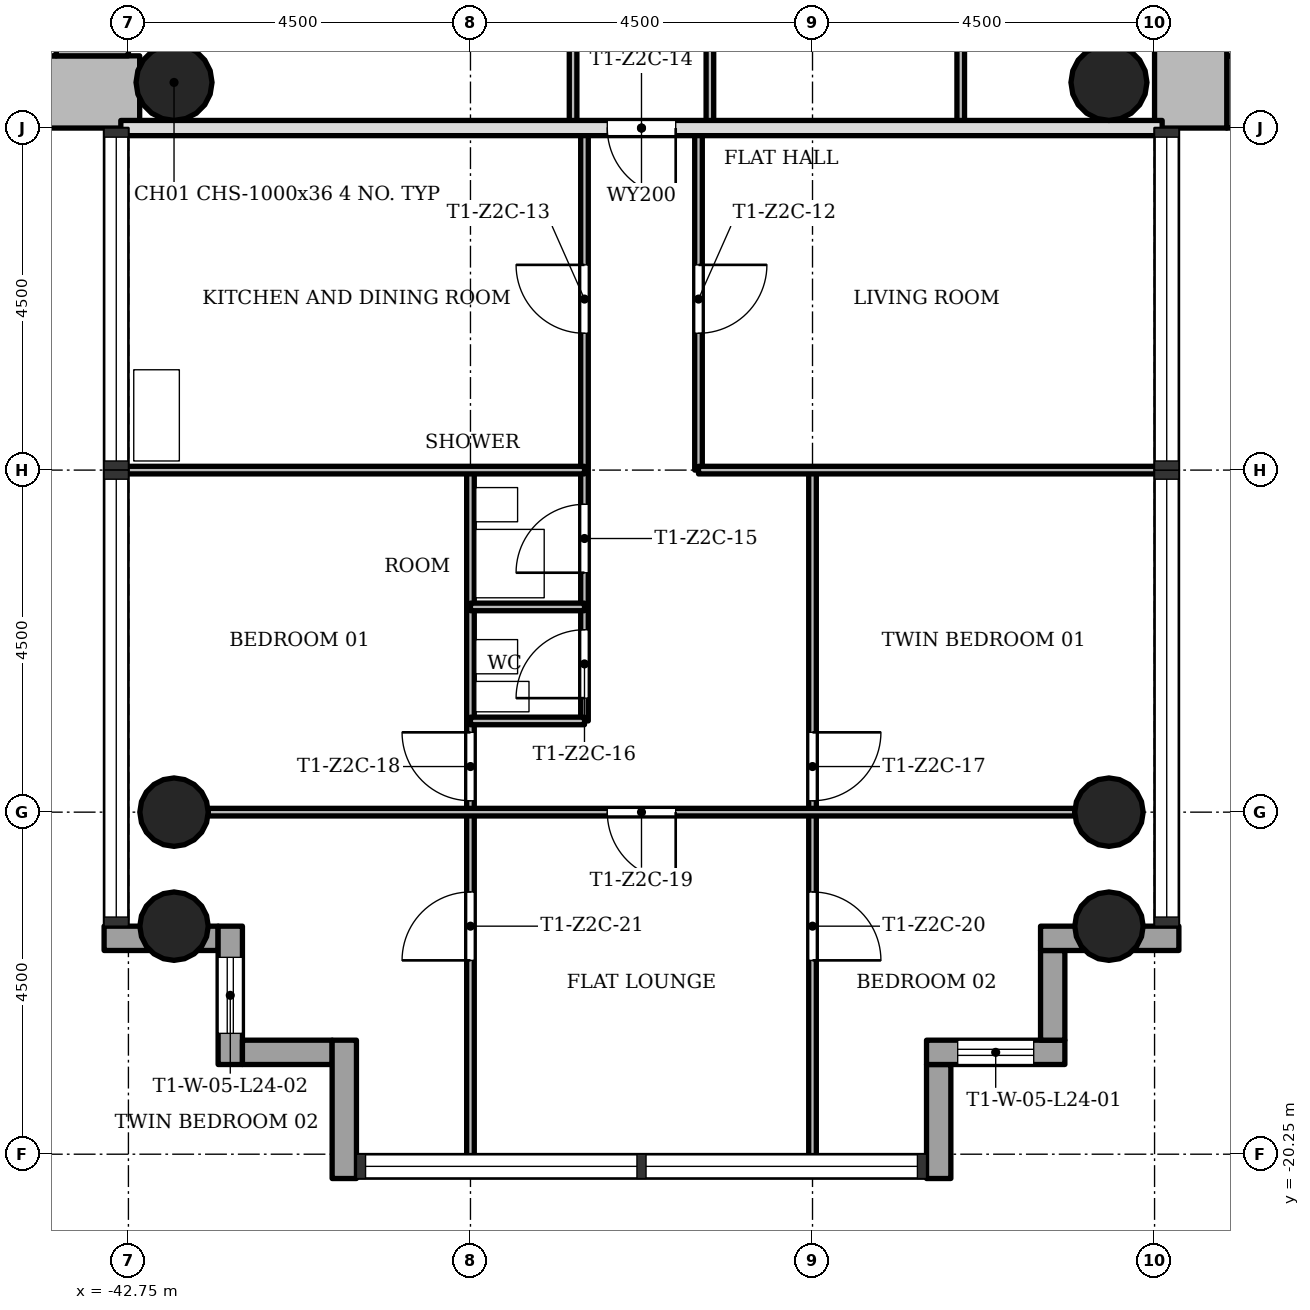
"""IFC4 building model, lengths in metres.
Left out: names, types, materials, properties, quantities, classifications, styles, units other than length and angle.
Written with IfcOpenShell. Run it as: python <this file> out.ifc"""

import sys

from ifc_helpers import new_model, si_unit, direction, frame, frame_2d, origin, origin_2d, place, context, subcontext, project, spatial, rectangle, hollow_circle, extrude, element, fill, save


model = new_model("IFC4")
c1 = context("Model", 3, precision=1e-05, world=origin(), true_north=direction((0.0, 1.0)))
c2 = subcontext(c1, "Body", "Model", "MODEL_VIEW")
j1 = project(units=[si_unit("LENGTHUNIT", "METRE"), si_unit("PLANEANGLEUNIT", "RADIAN")], contexts=[c1])
p1 = place(None, origin())
s1 = spatial("IfcSite", under=j1, at=p1, CompositionType="ELEMENT")
p2 = place(p1, origin())
s2 = spatial("IfcBuilding", under=s1, at=p2, CompositionType="ELEMENT")
p3 = place(p2, frame((0.0, 0.0, 90.2)))
s3 = spatial("IfcBuildingStorey", under=s2, at=p3, CompositionType="ELEMENT", Elevation=90.2)
p4 = place(p3, frame((-28.3, -6.275, 0.0), z_axis=(0.0, 0.0, 1.0), x_axis=(1.0, 0.0, 0.0)))
e1 = element("IfcWall", 1, at=p4, inside=s3, PredefinedType="SHEAR", context=c2, shape_type="SweptSolid", body=[
    extrude(rectangle(XDim=8.05, YDim=0.95, at=frame_2d((4.025, 0.0))), origin(), (0.0, 0.0, 1.0), 3.4),
])
p5 = place(p3, frame((-28.775, 5.8, 0.0), z_axis=(0.0, 0.0, 1.0), x_axis=(0.0, -1.0, 0.0)))
e2 = element("IfcWall", 2, at=p5, inside=s3, PredefinedType="SHEAR", context=c2, shape_type="SweptSolid", body=[
    extrude(rectangle(XDim=12.55, YDim=0.95, at=frame_2d((6.275, 0.0))), origin(), (0.0, 0.0, 1.0), 3.4),
])
p6 = place(p5, frame((4.9, 0.0, 0.0)))
e3 = element("IfcOpeningElement", 3, at=p6, cuts=e2, PredefinedType="OPENING", context=c2, shape_type="SweptSolid", body=[
    extrude(rectangle(XDim=1.8, YDim=2.1, at=frame_2d((0.9, 1.05))), frame((0.0, 0.485, 0.0), z_axis=(0.0, -1.0, 0.0), x_axis=(1.0, 0.0, 0.0)), (0.0, 0.0, 1.0), 0.97),
])
p7 = place(p3, frame((-51.298, -6.275, 0.0), z_axis=(0.0, 0.0, 1.0), x_axis=(1.0, 0.0, 0.0)))
e4 = element("IfcWall", 4, at=p7, inside=s3, PredefinedType="SHEAR", context=c2, shape_type="SweptSolid", body=[
    extrude(rectangle(XDim=8.696, YDim=0.95, at=frame_2d((4.348, 0.0))), origin(), (0.0, 0.0, 1.0), 3.4),
])
p8 = place(p3, frame((-43.225, -5.8, 0.0), z_axis=(0.0, 0.0, 1.0), x_axis=(0.0, 1.0, 0.0)))
e5 = element("IfcWall", 5, at=p8, inside=s3, PredefinedType="SHEAR", context=c2, shape_type="SweptSolid", body=[
    extrude(rectangle(XDim=12.55, YDim=0.95, at=frame_2d((6.275, 0.0))), origin(), (0.0, 0.0, 1.0), 3.4),
])
p9 = place(p8, frame((4.9, 0.0, 0.0)))
e6 = element("IfcOpeningElement", 6, at=p9, cuts=e5, PredefinedType="OPENING", context=c2, shape_type="SweptSolid", body=[
    extrude(rectangle(XDim=1.8, YDim=2.1, at=frame_2d((0.9, 1.05))), frame((0.0, 0.485, 0.0), z_axis=(0.0, -1.0, 0.0), x_axis=(1.0, 0.0, 0.0)), (0.0, 0.0, 1.0), 0.97),
])
for number, where, z_axis, x_axis in (
    (7, (-42.15, -15.75, 0.0), (0.0, 0.0, 1.0), (1.0, 0.0, 0.0)),
    (8, (-29.85, -15.75, 0.0), (0.0, 0.0, 1.0), (1.0, 0.0, 0.0)),
    (9, (-42.15, -17.25, 0.0), (0.0, 0.0, 1.0), (1.0, 0.0, 0.0)),
    (10, (-29.85, -17.25, 0.0), (0.0, 0.0, 1.0), (1.0, 0.0, 0.0)),
):
    element("IfcColumn", number, at=place(p3, frame(where, z_axis=z_axis, x_axis=x_axis)), inside=s3, PredefinedType="COLUMN", context=c2, shape_type="SweptSolid", body=[
        extrude(hollow_circle(Radius=0.45, WallThickness=0.032, at=origin_2d()), origin(), (0.0, 0.0, 1.0), 3.4),
    ])
for number, where, z_axis, x_axis in (
    (11, (-42.15, -6.15, 0.0), (0.0, 0.0, 1.0), (1.0, 0.0, 0.0)),
    (12, (-29.85, -6.15, 0.0), (0.0, 0.0, 1.0), (1.0, 0.0, 0.0)),
):
    element("IfcColumn", number, at=place(p3, frame(where, z_axis=z_axis, x_axis=x_axis)), inside=s3, PredefinedType="COLUMN", context=c2, shape_type="SweptSolid", body=[
        extrude(hollow_circle(Radius=0.5, WallThickness=0.036, at=origin_2d()), origin(), (0.0, 0.0, 1.0), 3.4),
    ])
p10 = place(p3, frame((-43.07, -17.41, -0.3), z_axis=(0.0, 0.0, 1.0), x_axis=(1.0, 0.0, 0.0)))
e13 = element("IfcWall", 13, at=p10, inside=s3, PredefinedType="STANDARD", context=c2, shape_type="SweptSolid", body=[
    extrude(rectangle(XDim=1.5, YDim=0.32, at=frame_2d((0.75, 0.0))), origin(), (0.0, 0.0, 1.0), 3.4),
])
p11 = place(p3, frame((-41.41, -17.25, -0.3), z_axis=(0.0, 0.0, 1.0), x_axis=(0.0, -1.0, 0.0)))
e14 = element("IfcWall", 14, at=p11, inside=s3, PredefinedType="STANDARD", context=c2, shape_type="SweptSolid", body=[
    extrude(rectangle(XDim=1.82, YDim=0.32, at=frame_2d((0.91, 0.0))), origin(), (0.0, 0.0, 1.0), 3.4),
])
p12 = place(p11, frame((0.41, 0.0, 1.2)))
e15 = element("IfcOpeningElement", 15, at=p12, cuts=e14, PredefinedType="OPENING", context=c2, shape_type="SweptSolid", body=[
    extrude(rectangle(XDim=1.0, YDim=1.5, at=frame_2d((0.5, 0.75))), frame((0.0, 0.17, 0.0), z_axis=(0.0, -1.0, 0.0), x_axis=(1.0, 0.0, 0.0)), (0.0, 0.0, 1.0), 0.34),
])
p13 = place(p3, frame((-41.25, -18.91, -0.3), z_axis=(0.0, 0.0, 1.0), x_axis=(1.0, 0.0, 0.0)))
e16 = element("IfcWall", 16, at=p13, inside=s3, PredefinedType="STANDARD", context=c2, shape_type="SweptSolid", body=[
    extrude(rectangle(XDim=1.18, YDim=0.32, at=frame_2d((0.59, 0.0))), origin(), (0.0, 0.0, 1.0), 3.4),
])
p14 = place(p3, frame((-39.91, -18.75, -0.3), z_axis=(0.0, 0.0, 1.0), x_axis=(0.0, -1.0, 0.0)))
e17 = element("IfcWall", 17, at=p14, inside=s3, PredefinedType="STANDARD", context=c2, shape_type="SweptSolid", body=[
    extrude(rectangle(XDim=1.82, YDim=0.32, at=frame_2d((0.91, 0.0))), origin(), (0.0, 0.0, 1.0), 3.4),
])
p15 = place(p3, frame((-32.09, -20.57, -0.3), z_axis=(0.0, 0.0, 1.0), x_axis=(0.0, 1.0, 0.0)))
e18 = element("IfcWall", 18, at=p15, inside=s3, PredefinedType="STANDARD", context=c2, shape_type="SweptSolid", body=[
    extrude(rectangle(XDim=1.5, YDim=0.32, at=frame_2d((0.75, 0.0))), origin(), (0.0, 0.0, 1.0), 3.4),
])
p16 = place(p3, frame((-32.25, -18.91, -0.3), z_axis=(0.0, 0.0, 1.0), x_axis=(1.0, 0.0, 0.0)))
e19 = element("IfcWall", 19, at=p16, inside=s3, PredefinedType="STANDARD", context=c2, shape_type="SweptSolid", body=[
    extrude(rectangle(XDim=1.82, YDim=0.32, at=frame_2d((0.91, 0.0))), origin(), (0.0, 0.0, 1.0), 3.4),
])
p17 = place(p16, frame((0.41, 0.0, 1.2)))
e20 = element("IfcOpeningElement", 20, at=p17, cuts=e19, PredefinedType="OPENING", context=c2, shape_type="SweptSolid", body=[
    extrude(rectangle(XDim=1.0, YDim=1.5, at=frame_2d((0.5, 0.75))), frame((0.0, 0.17, 0.0), z_axis=(0.0, -1.0, 0.0), x_axis=(1.0, 0.0, 0.0)), (0.0, 0.0, 1.0), 0.34),
])
p18 = place(p3, frame((-30.59, -18.75, -0.3), z_axis=(0.0, 0.0, 1.0), x_axis=(0.0, 1.0, 0.0)))
e21 = element("IfcWall", 21, at=p18, inside=s3, PredefinedType="STANDARD", context=c2, shape_type="SweptSolid", body=[
    extrude(rectangle(XDim=1.18, YDim=0.32, at=frame_2d((0.59, 0.0))), origin(), (0.0, 0.0, 1.0), 3.4),
])
p19 = place(p3, frame((-30.75, -17.41, -0.3), z_axis=(0.0, 0.0, 1.0), x_axis=(1.0, 0.0, 0.0)))
e22 = element("IfcWall", 22, at=p19, inside=s3, PredefinedType="STANDARD", context=c2, shape_type="SweptSolid", body=[
    extrude(rectangle(XDim=1.82, YDim=0.32, at=frame_2d((0.91, 0.0))), origin(), (0.0, 0.0, 1.0), 3.4),
])
p20 = place(p3, frame((-38.25, -20.35, 0.0), z_axis=(0.0, 0.0, 1.0), x_axis=(0.0, 1.0, 0.0)))
e23 = element("IfcWall", 23, at=p20, inside=s3, PredefinedType="PARTITIONING", context=c2, shape_type="SweptSolid", body=[
    extrude(rectangle(XDim=9.1, YDim=0.1, at=frame_2d((4.55, 0.0))), origin(), (0.0, 0.0, 1.0), 3.0),
])
p21 = place(p20, frame((4.75, 0.0, 0.0)))
e24 = element("IfcOpeningElement", 24, at=p21, cuts=e23, PredefinedType="OPENING", context=c2, shape_type="SweptSolid", body=[
    extrude(rectangle(XDim=0.9, YDim=2.1, at=frame_2d((0.45, 1.05))), frame((0.0, 0.06, 0.0), z_axis=(0.0, -1.0, 0.0), x_axis=(1.0, 0.0, 0.0)), (0.0, 0.0, 1.0), 0.12),
])
p22 = place(p20, frame((2.65, 0.0, 0.0)))
e25 = element("IfcOpeningElement", 25, at=p22, cuts=e23, PredefinedType="OPENING", context=c2, shape_type="SweptSolid", body=[
    extrude(rectangle(XDim=0.9, YDim=2.1, at=frame_2d((0.45, 1.05))), frame((0.0, 0.06, 0.0), z_axis=(0.0, -1.0, 0.0), x_axis=(1.0, 0.0, 0.0)), (0.0, 0.0, 1.0), 0.12),
])
p23 = place(p3, frame((-36.9, -6.75, 0.0), z_axis=(0.0, 0.0, 1.0), x_axis=(0.0, 1.0, 0.0)))
e26 = element("IfcWall", 26, at=p23, inside=s3, PredefinedType="PARTITIONING", context=c2, shape_type="SweptSolid", body=[
    extrude(rectangle(XDim=5.25, YDim=0.1, at=frame_2d((2.625, 0.0))), origin(), (0.0, 0.0, 1.0), 3.0),
])
p24 = place(p3, frame((-36.75, -14.55, 0.0), z_axis=(0.0, 0.0, 1.0), x_axis=(0.0, 1.0, 0.0)))
e27 = element("IfcWall", 27, at=p24, inside=s3, PredefinedType="PARTITIONING", context=c2, shape_type="SweptSolid", body=[
    extrude(rectangle(XDim=7.8, YDim=0.1, at=frame_2d((3.9, 0.0))), origin(), (0.0, 0.0, 1.0), 3.0),
])
p25 = place(p24, frame((5.1, 0.0, 0.0)))
e28 = element("IfcOpeningElement", 28, at=p25, cuts=e27, PredefinedType="OPENING", context=c2, shape_type="SweptSolid", body=[
    extrude(rectangle(XDim=0.9, YDim=2.1, at=frame_2d((0.45, 1.05))), frame((0.0, 0.06, 0.0), z_axis=(0.0, -1.0, 0.0), x_axis=(1.0, 0.0, 0.0)), (0.0, 0.0, 1.0), 0.12),
])
p26 = place(p24, frame((1.95, 0.0, 0.0)))
e29 = element("IfcOpeningElement", 29, at=p26, cuts=e27, PredefinedType="OPENING", context=c2, shape_type="SweptSolid", body=[
    extrude(rectangle(XDim=0.9, YDim=2.1, at=frame_2d((0.45, 1.05))), frame((0.0, 0.06, 0.0), z_axis=(0.0, -1.0, 0.0), x_axis=(1.0, 0.0, 0.0)), (0.0, 0.0, 1.0), 0.12),
])
p27 = place(p24, frame((0.3, 0.0, 0.0)))
e30 = element("IfcOpeningElement", 30, at=p27, cuts=e27, PredefinedType="OPENING", context=c2, shape_type="SweptSolid", body=[
    extrude(rectangle(XDim=0.9, YDim=2.1, at=frame_2d((0.45, 1.05))), frame((0.0, 0.06, 0.0), z_axis=(0.0, -1.0, 0.0), x_axis=(1.0, 0.0, 0.0)), (0.0, 0.0, 1.0), 0.12),
])
p28 = place(p3, frame((-35.25, -11.25, 0.0), z_axis=(0.0, 0.0, 1.0), x_axis=(0.0, 1.0, 0.0)))
e31 = element("IfcWall", 31, at=p28, inside=s3, PredefinedType="PARTITIONING", context=c2, shape_type="SweptSolid", body=[
    extrude(rectangle(XDim=4.5, YDim=0.1, at=frame_2d((2.25, 0.0))), origin(), (0.0, 0.0, 1.0), 3.0),
])
p29 = place(p28, frame((1.8, 0.0, 0.0)))
e32 = element("IfcOpeningElement", 32, at=p29, cuts=e31, PredefinedType="OPENING", context=c2, shape_type="SweptSolid", body=[
    extrude(rectangle(XDim=0.9, YDim=2.1, at=frame_2d((0.45, 1.05))), frame((0.0, 0.06, 0.0), z_axis=(0.0, -1.0, 0.0), x_axis=(1.0, 0.0, 0.0)), (0.0, 0.0, 1.0), 0.12),
])
p30 = place(p3, frame((-35.1, -6.75, 0.0), z_axis=(0.0, 0.0, 1.0), x_axis=(0.0, 1.0, 0.0)))
e33 = element("IfcWall", 33, at=p30, inside=s3, PredefinedType="PARTITIONING", context=c2, shape_type="SweptSolid", body=[
    extrude(rectangle(XDim=5.25, YDim=0.1, at=frame_2d((2.625, 0.0))), origin(), (0.0, 0.0, 1.0), 3.0),
])
p31 = place(p30, frame((2.175, 0.0, 0.0)))
e34 = element("IfcOpeningElement", 34, at=p31, cuts=e33, PredefinedType="OPENING", context=c2, shape_type="SweptSolid", body=[
    extrude(rectangle(XDim=0.9, YDim=2.1, at=frame_2d((0.45, 1.05))), frame((0.0, 0.06, 0.0), z_axis=(0.0, -1.0, 0.0), x_axis=(1.0, 0.0, 0.0)), (0.0, 0.0, 1.0), 0.12),
])
p32 = place(p3, frame((-33.75, -20.35, 0.0), z_axis=(0.0, 0.0, 1.0), x_axis=(0.0, 1.0, 0.0)))
e35 = element("IfcWall", 35, at=p32, inside=s3, PredefinedType="PARTITIONING", context=c2, shape_type="SweptSolid", body=[
    extrude(rectangle(XDim=9.1, YDim=0.1, at=frame_2d((4.55, 0.0))), origin(), (0.0, 0.0, 1.0), 3.0),
])
p33 = place(p32, frame((4.75, 0.0, 0.0)))
e36 = element("IfcOpeningElement", 36, at=p33, cuts=e35, PredefinedType="OPENING", context=c2, shape_type="SweptSolid", body=[
    extrude(rectangle(XDim=0.9, YDim=2.1, at=frame_2d((0.45, 1.05))), frame((0.0, 0.06, 0.0), z_axis=(0.0, -1.0, 0.0), x_axis=(1.0, 0.0, 0.0)), (0.0, 0.0, 1.0), 0.12),
])
p34 = place(p32, frame((2.65, 0.0, 0.0)))
e37 = element("IfcOpeningElement", 37, at=p34, cuts=e35, PredefinedType="OPENING", context=c2, shape_type="SweptSolid", body=[
    extrude(rectangle(XDim=0.9, YDim=2.1, at=frame_2d((0.45, 1.05))), frame((0.0, 0.06, 0.0), z_axis=(0.0, -1.0, 0.0), x_axis=(1.0, 0.0, 0.0)), (0.0, 0.0, 1.0), 0.12),
])
p35 = place(p3, frame((-31.8, -6.75, 0.0), z_axis=(0.0, 0.0, 1.0), x_axis=(0.0, 1.0, 0.0)))
e38 = element("IfcWall", 38, at=p35, inside=s3, PredefinedType="PARTITIONING", context=c2, shape_type="SweptSolid", body=[
    extrude(rectangle(XDim=5.25, YDim=0.1, at=frame_2d((2.625, 0.0))), origin(), (0.0, 0.0, 1.0), 3.0),
])
p36 = place(p3, frame((-41.7, -15.75, 0.0), z_axis=(0.0, 0.0, 1.0), x_axis=(1.0, 0.0, 0.0)))
e39 = element("IfcWall", 39, at=p36, inside=s3, PredefinedType="PARTITIONING", context=c2, shape_type="SweptSolid", body=[
    extrude(rectangle(XDim=11.4, YDim=0.1, at=frame_2d((5.7, 0.0))), origin(), (0.0, 0.0, 1.0), 3.0),
])
p37 = place(p36, frame((5.25, 0.0, 0.0)))
e40 = element("IfcOpeningElement", 40, at=p37, cuts=e39, PredefinedType="OPENING", context=c2, shape_type="SweptSolid", body=[
    extrude(rectangle(XDim=0.9, YDim=2.1, at=frame_2d((0.45, 1.05))), frame((0.0, 0.06, 0.0), z_axis=(0.0, -1.0, 0.0), x_axis=(1.0, 0.0, 0.0)), (0.0, 0.0, 1.0), 0.12),
])
for number, where, z_axis, x_axis in (
    (41, (-38.25, -14.55, 0.0), (0.0, 0.0, 1.0), (1.0, 0.0, 0.0)),
    (42, (-38.25, -13.05, 0.0), (0.0, 0.0, 1.0), (1.0, 0.0, 0.0)),
):
    element("IfcWall", number, at=place(p3, frame(where, z_axis=z_axis, x_axis=x_axis)), inside=s3, PredefinedType="PARTITIONING", context=c2, shape_type="SweptSolid", body=[
        extrude(rectangle(XDim=1.5, YDim=0.1, at=frame_2d((0.75, 0.0))), origin(), (0.0, 0.0, 1.0), 3.0),
    ])
for number, where, z_axis, x_axis in (
    (43, (-42.85, -11.25, 0.0), (0.0, 0.0, 1.0), (1.0, 0.0, 0.0)),
    (44, (-35.25, -11.25, 0.0), (0.0, 0.0, 1.0), (1.0, 0.0, 0.0)),
):
    element("IfcWall", number, at=place(p3, frame(where, z_axis=z_axis, x_axis=x_axis)), inside=s3, PredefinedType="PARTITIONING", context=c2, shape_type="SweptSolid", body=[
        extrude(rectangle(XDim=6.1, YDim=0.1, at=frame_2d((3.05, 0.0))), origin(), (0.0, 0.0, 1.0), 3.0),
    ])
p38 = place(p3, frame((-42.85, -6.75, 0.0), z_axis=(0.0, 0.0, 1.0), x_axis=(1.0, 0.0, 0.0)))
e45 = element("IfcWall", 45, at=p38, inside=s3, PredefinedType="SOLIDWALL", context=c2, shape_type="SweptSolid", body=[
    extrude(rectangle(XDim=13.7, YDim=0.2, at=frame_2d((6.85, 0.0))), origin(), (0.0, 0.0, 1.0), 3.0),
])
p39 = place(p38, frame((6.4, 0.0, 0.0)))
e46 = element("IfcOpeningElement", 46, at=p39, cuts=e45, PredefinedType="OPENING", context=c2, shape_type="SweptSolid", body=[
    extrude(rectangle(XDim=0.9, YDim=2.1, at=frame_2d((0.45, 1.05))), frame((0.0, 0.11, 0.0), z_axis=(0.0, -1.0, 0.0), x_axis=(1.0, 0.0, 0.0)), (0.0, 0.0, 1.0), 0.22),
])
p40 = place(p3, frame((-43.825, -1.9, 0.0), z_axis=(0.0, 0.0, 1.0), x_axis=(0.0, -1.0, 0.0)))
e47 = element("IfcWall", 47, at=p40, inside=s3, PredefinedType="SHEAR", context=c2, shape_type="SweptSolid", body=[
    extrude(rectangle(XDim=3.9, YDim=0.25, at=frame_2d((1.95, 0.0))), origin(), (0.0, 0.0, 1.0), 3.4),
])
p41 = place(p29, origin())
e48 = element("IfcDoor", 48, at=p41, inside=s3, OperationType="SINGLE_SWING_RIGHT", PredefinedType="DOOR", context=c2, shape_type="SweptSolid", body=[
    extrude(rectangle(XDim=0.9, YDim=2.1, at=frame_2d((0.45, 1.05))), frame((0.0, 0.025, 0.0), z_axis=(0.0, -1.0, 0.0), x_axis=(1.0, 0.0, 0.0)), (0.0, 0.0, 1.0), 0.05),
])
fill(e32, e48)
p42 = place(p25, origin())
e49 = element("IfcDoor", 49, at=p42, inside=s3, OperationType="SINGLE_SWING_LEFT", PredefinedType="DOOR", context=c2, shape_type="SweptSolid", body=[
    extrude(rectangle(XDim=0.9, YDim=2.1, at=frame_2d((0.45, 1.05))), frame((0.0, 0.025, 0.0), z_axis=(0.0, -1.0, 0.0), x_axis=(1.0, 0.0, 0.0)), (0.0, 0.0, 1.0), 0.05),
])
fill(e28, e49)
p43 = place(p39, origin())
e50 = element("IfcDoor", 50, at=p43, inside=s3, OperationType="SINGLE_SWING_RIGHT", PredefinedType="DOOR", context=c2, shape_type="SweptSolid", body=[
    extrude(rectangle(XDim=0.9, YDim=2.1, at=frame_2d((0.45, 1.05))), frame((0.0, 0.025, 0.0), z_axis=(0.0, -1.0, 0.0), x_axis=(1.0, 0.0, 0.0)), (0.0, 0.0, 1.0), 0.05),
])
fill(e46, e50)
p44 = place(p26, origin())
e51 = element("IfcDoor", 51, at=p44, inside=s3, OperationType="SINGLE_SWING_RIGHT", PredefinedType="DOOR", context=c2, shape_type="SweptSolid", body=[
    extrude(rectangle(XDim=0.9, YDim=2.1, at=frame_2d((0.45, 1.05))), frame((0.0, 0.025, 0.0), z_axis=(0.0, -1.0, 0.0), x_axis=(1.0, 0.0, 0.0)), (0.0, 0.0, 1.0), 0.05),
])
fill(e29, e51)
p45 = place(p27, origin())
e52 = element("IfcDoor", 52, at=p45, inside=s3, OperationType="SINGLE_SWING_RIGHT", PredefinedType="DOOR", context=c2, shape_type="SweptSolid", body=[
    extrude(rectangle(XDim=0.9, YDim=2.1, at=frame_2d((0.45, 1.05))), frame((0.0, 0.025, 0.0), z_axis=(0.0, -1.0, 0.0), x_axis=(1.0, 0.0, 0.0)), (0.0, 0.0, 1.0), 0.05),
])
fill(e30, e52)
p46 = place(p33, origin())
e53 = element("IfcDoor", 53, at=p46, inside=s3, OperationType="SINGLE_SWING_RIGHT", PredefinedType="DOOR", context=c2, shape_type="SweptSolid", body=[
    extrude(rectangle(XDim=0.9, YDim=2.1, at=frame_2d((0.45, 1.05))), frame((0.0, 0.025, 0.0), z_axis=(0.0, -1.0, 0.0), x_axis=(1.0, 0.0, 0.0)), (0.0, 0.0, 1.0), 0.05),
])
fill(e36, e53)
p47 = place(p21, origin())
e54 = element("IfcDoor", 54, at=p47, inside=s3, OperationType="SINGLE_SWING_LEFT", PredefinedType="DOOR", context=c2, shape_type="SweptSolid", body=[
    extrude(rectangle(XDim=0.9, YDim=2.1, at=frame_2d((0.45, 1.05))), frame((0.0, 0.025, 0.0), z_axis=(0.0, -1.0, 0.0), x_axis=(1.0, 0.0, 0.0)), (0.0, 0.0, 1.0), 0.05),
])
fill(e24, e54)
p48 = place(p37, origin())
e55 = element("IfcDoor", 55, at=p48, inside=s3, OperationType="SINGLE_SWING_RIGHT", PredefinedType="DOOR", context=c2, shape_type="SweptSolid", body=[
    extrude(rectangle(XDim=0.9, YDim=2.1, at=frame_2d((0.45, 1.05))), frame((0.0, 0.025, 0.0), z_axis=(0.0, -1.0, 0.0), x_axis=(1.0, 0.0, 0.0)), (0.0, 0.0, 1.0), 0.05),
])
fill(e40, e55)
p49 = place(p34, origin())
e56 = element("IfcDoor", 56, at=p49, inside=s3, OperationType="SINGLE_SWING_LEFT", PredefinedType="DOOR", context=c2, shape_type="SweptSolid", body=[
    extrude(rectangle(XDim=0.9, YDim=2.1, at=frame_2d((0.45, 1.05))), frame((0.0, 0.025, 0.0), z_axis=(0.0, -1.0, 0.0), x_axis=(1.0, 0.0, 0.0)), (0.0, 0.0, 1.0), 0.05),
])
fill(e37, e56)
p50 = place(p22, origin())
e57 = element("IfcDoor", 57, at=p50, inside=s3, OperationType="SINGLE_SWING_RIGHT", PredefinedType="DOOR", context=c2, shape_type="SweptSolid", body=[
    extrude(rectangle(XDim=0.9, YDim=2.1, at=frame_2d((0.45, 1.05))), frame((0.0, 0.025, 0.0), z_axis=(0.0, -1.0, 0.0), x_axis=(1.0, 0.0, 0.0)), (0.0, 0.0, 1.0), 0.05),
])
fill(e25, e57)
p51 = place(p17, origin())
e58 = element("IfcWindow", 58, at=p51, inside=s3, PartitioningType="SINGLE_PANEL", PredefinedType="WINDOW", context=c2, shape_type="SweptSolid", body=[
    extrude(rectangle(XDim=1.0, YDim=1.5, at=frame_2d((0.5, 0.75))), frame((0.0, 0.03, 0.0), z_axis=(0.0, -1.0, 0.0), x_axis=(1.0, 0.0, 0.0)), (0.0, 0.0, 1.0), 0.06),
])
fill(e20, e58)
p52 = place(p12, origin())
e59 = element("IfcWindow", 59, at=p52, inside=s3, PartitioningType="SINGLE_PANEL", PredefinedType="WINDOW", context=c2, shape_type="SweptSolid", body=[
    extrude(rectangle(XDim=1.0, YDim=1.5, at=frame_2d((0.5, 0.75))), frame((0.0, 0.03, 0.0), z_axis=(0.0, -1.0, 0.0), x_axis=(1.0, 0.0, 0.0)), (0.0, 0.0, 1.0), 0.06),
])
fill(e15, e59)
save(model, sys.argv[1])
